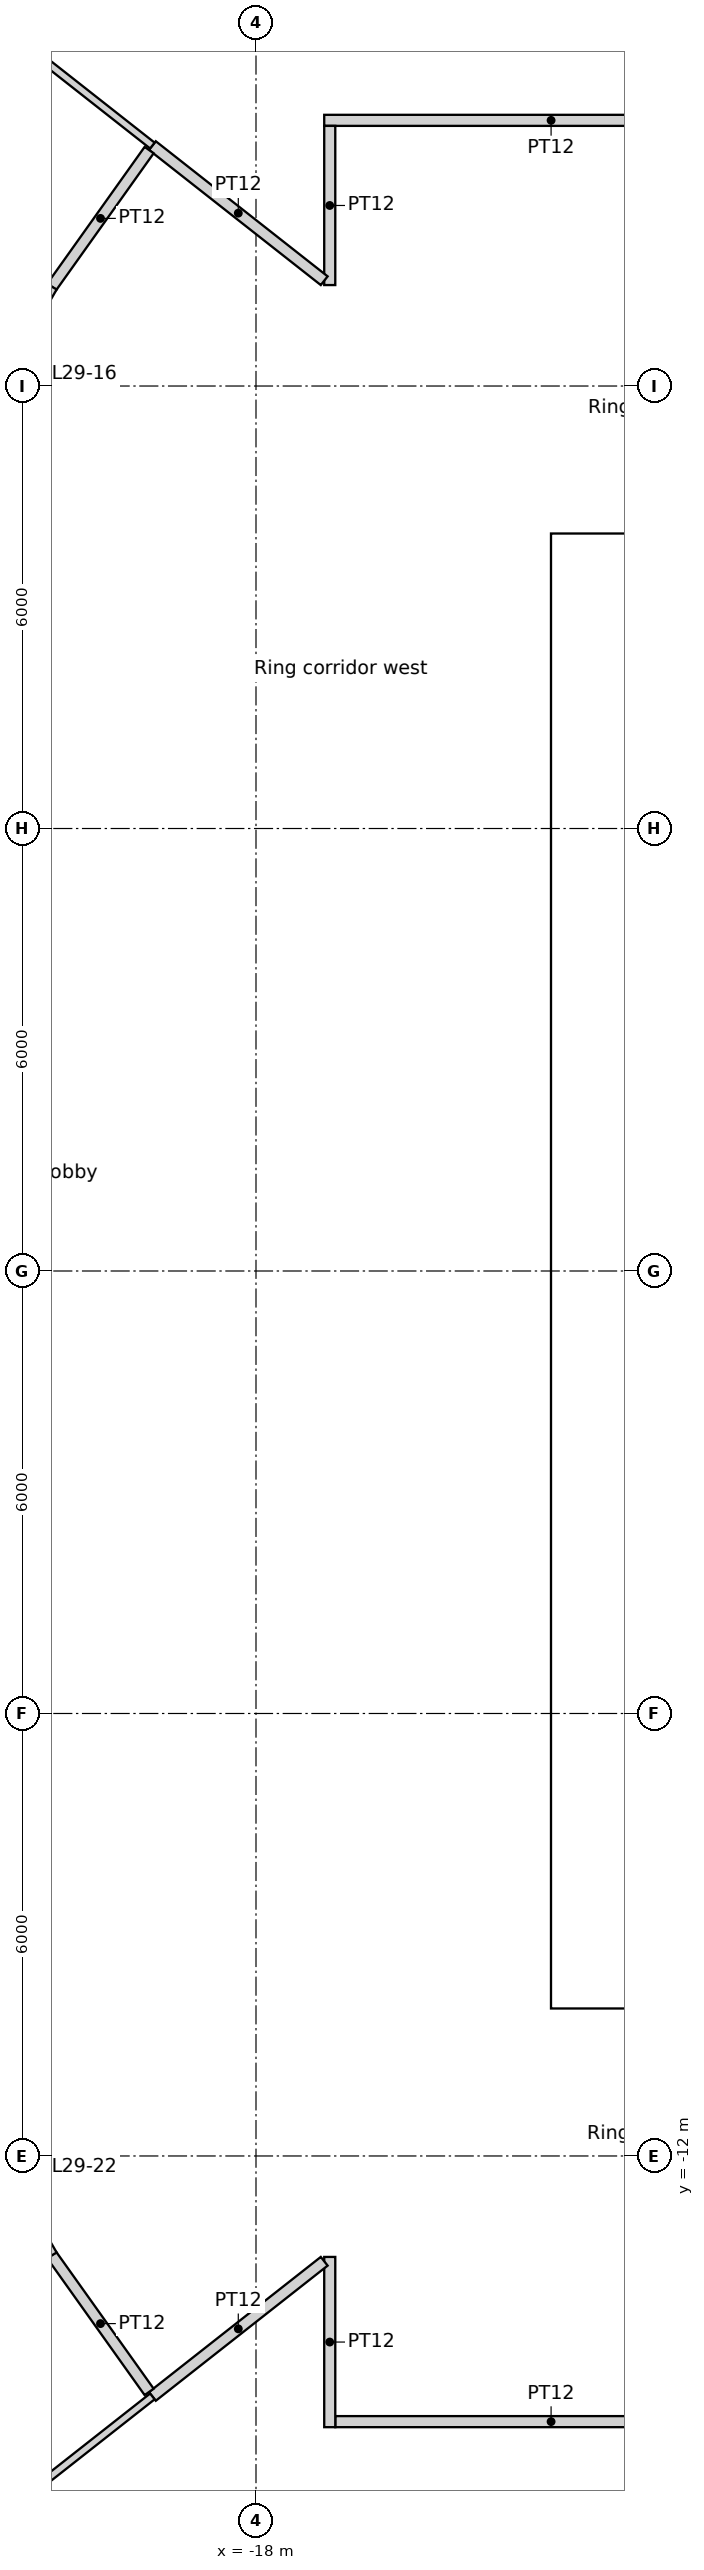
"""IFC4 building model, lengths in metres.
Left out: names, types, materials, properties, quantities, classifications, styles, units other than length and angle.
Written with IfcOpenShell. Run it as: python <this file> out.ifc"""

import sys

from ifc_helpers import new_model, si_unit, direction, frame, frame_2d, origin, origin_2d, place, context, subcontext, project, spatial, rectangle, circle, extrude, element, fill, save


model = new_model("IFC4")
c1 = context("Model", 3, precision=1e-05, world=origin(), true_north=direction((0.0, 1.0)))
c2 = subcontext(c1, "Body", "Model", "MODEL_VIEW")
j1 = project(units=[si_unit("LENGTHUNIT", "METRE"), si_unit("PLANEANGLEUNIT", "RADIAN")], contexts=[c1])
p1 = place(None, origin())
s1 = spatial("IfcSite", under=j1, at=p1, CompositionType="ELEMENT")
p2 = place(p1, origin())
s2 = spatial("IfcBuilding", under=s1, at=p2, CompositionType="ELEMENT")
p3 = place(p2, frame((0.0, 0.0, 114.6)))
s3 = spatial("IfcBuildingStorey", under=s2, at=p3, CompositionType="ELEMENT", Elevation=114.6)
for number, where, z_axis, x_axis in (
    (1, (-20.509, 13.489, 0.0), (0.0, 0.0, 1.0), (1.0, 0.0, 0.0)),
    (2, (-20.509, -13.489, 0.0), (0.0, 0.0, 1.0), (1.0, 0.0, 0.0)),
):
    element("IfcColumn", number, at=place(p3, frame(where, z_axis=z_axis, x_axis=x_axis)), inside=s3, PredefinedType="COLUMN", context=c2, shape_type="SweptSolid", body=[
        extrude(circle(Radius=0.65, at=origin_2d()), origin(), (0.0, 0.0, 1.0), 5.4),
    ])
for number, where, z_axis, x_axis in (
    (3, (-13.798, 12.802, 0.0), (0.0, 0.0, 1.0), (1.0, 0.0, 0.0)),
    (4, (-16.958, 8.167, 0.0), (0.0, 0.0, 1.0), (1.0, 0.0, 0.0)),
    (5, (-18.612, 2.805, 0.0), (0.0, 0.0, 1.0), (1.0, 0.0, 0.0)),
    (6, (-18.612, -2.805, 0.0), (0.0, 0.0, 1.0), (1.0, 0.0, 0.0)),
    (7, (-16.958, -8.167, 0.0), (0.0, 0.0, 1.0), (1.0, 0.0, 0.0)),
    (8, (-13.798, -12.802, 0.0), (0.0, 0.0, 1.0), (1.0, 0.0, 0.0)),
):
    element("IfcColumn", number, at=place(p3, frame(where, z_axis=z_axis, x_axis=x_axis)), inside=s3, PredefinedType="COLUMN", context=c2, shape_type="SweptSolid", body=[
        extrude(circle(Radius=0.7, at=origin_2d()), origin(), (0.0, 0.0, 1.0), 5.4),
    ])
p4 = place(p3, frame((-14.0, -9.4, 0.0), z_axis=(0.0, 0.0, 1.0), x_axis=(1.0, 0.0, 0.0)))
e9 = element("IfcWall", 9, at=p4, inside=s3, PredefinedType="SOLIDWALL", context=c2, shape_type="SweptSolid", body=[
    extrude(rectangle(XDim=28.0, YDim=1.2, at=frame_2d((14.0, 0.0))), origin(), (0.0, 0.0, 1.0), 5.4),
])
p5 = place(p4, frame((14.9, 0.0, 0.0)))
e10 = element("IfcOpeningElement", 10, at=p5, cuts=e9, PredefinedType="OPENING", context=c2, shape_type="SweptSolid", body=[
    extrude(rectangle(XDim=1.0, YDim=2.1, at=frame_2d((0.5, 1.05))), frame((0.0, 0.6, 0.0), z_axis=(0.0, -1.0, 0.0), x_axis=(1.0, 0.0, 0.0)), (0.0, 0.0, 1.0), 1.2),
])
p6 = place(p4, frame((9.8, 0.0, 0.0)))
e11 = element("IfcOpeningElement", 11, at=p6, cuts=e9, PredefinedType="OPENING", context=c2, shape_type="SweptSolid", body=[
    extrude(rectangle(XDim=1.8, YDim=2.1, at=frame_2d((0.9, 1.05))), frame((0.0, 0.6, 0.0), z_axis=(0.0, -1.0, 0.0), x_axis=(1.0, 0.0, 0.0)), (0.0, 0.0, 1.0), 1.2),
])
p7 = place(p4, frame((16.4, 0.0, 0.0)))
e12 = element("IfcOpeningElement", 12, at=p7, cuts=e9, PredefinedType="OPENING", context=c2, shape_type="SweptSolid", body=[
    extrude(rectangle(XDim=1.8, YDim=2.1, at=frame_2d((0.9, 1.05))), frame((0.0, 0.6, 0.0), z_axis=(0.0, -1.0, 0.0), x_axis=(1.0, 0.0, 0.0)), (0.0, 0.0, 1.0), 1.2),
])
p8 = place(p3, frame((-14.0, 9.4, 0.0), z_axis=(0.0, 0.0, 1.0), x_axis=(1.0, 0.0, 0.0)))
e13 = element("IfcWall", 13, at=p8, inside=s3, PredefinedType="SOLIDWALL", context=c2, shape_type="SweptSolid", body=[
    extrude(rectangle(XDim=28.0, YDim=1.2, at=frame_2d((14.0, 0.0))), origin(), (0.0, 0.0, 1.0), 5.4),
])
p9 = place(p8, frame((9.8, 0.0, 0.0)))
e14 = element("IfcOpeningElement", 14, at=p9, cuts=e13, PredefinedType="OPENING", context=c2, shape_type="SweptSolid", body=[
    extrude(rectangle(XDim=1.8, YDim=2.1, at=frame_2d((0.9, 1.05))), frame((0.0, 0.6, 0.0), z_axis=(0.0, -1.0, 0.0), x_axis=(1.0, 0.0, 0.0)), (0.0, 0.0, 1.0), 1.2),
])
p10 = place(p3, frame((-13.4, -8.8, 0.0), z_axis=(0.0, 0.0, 1.0), x_axis=(0.0, 1.0, 0.0)))
e15 = element("IfcWall", 15, at=p10, inside=s3, PredefinedType="SOLIDWALL", context=c2, shape_type="SweptSolid", body=[
    extrude(rectangle(XDim=17.6, YDim=1.2, at=frame_2d((8.8, 0.0))), origin(), (0.0, 0.0, 1.0), 5.4),
])
p11 = place(p10, frame((5.2, 0.0, 0.0)))
e16 = element("IfcOpeningElement", 16, at=p11, cuts=e15, PredefinedType="OPENING", context=c2, shape_type="SweptSolid", body=[
    extrude(rectangle(XDim=1.0, YDim=2.1, at=frame_2d((0.5, 1.05))), frame((0.0, 0.6, 0.0), z_axis=(0.0, -1.0, 0.0), x_axis=(1.0, 0.0, 0.0)), (0.0, 0.0, 1.0), 1.2),
])
p12 = place(p10, frame((11.4, 0.0, 0.0)))
e17 = element("IfcOpeningElement", 17, at=p12, cuts=e15, PredefinedType="OPENING", context=c2, shape_type="SweptSolid", body=[
    extrude(rectangle(XDim=1.0, YDim=2.1, at=frame_2d((0.5, 1.05))), frame((0.0, 0.6, 0.0), z_axis=(0.0, -1.0, 0.0), x_axis=(1.0, 0.0, 0.0)), (0.0, 0.0, 1.0), 1.2),
])
for number, where, z_axis, x_axis in (
    (18, (-24.638, -19.376, 0.0), (0.0, 0.0, 1.0), (0.786, 0.618, 0.0)),
    (19, (-24.638, 19.376, 0.0), (0.0, 0.0, 1.0), (0.786, -0.618, 0.0)),
):
    element("IfcWall", number, at=place(p3, frame(where, z_axis=z_axis, x_axis=x_axis)), inside=s3, PredefinedType="PARTITIONING", context=c2, shape_type="SweptSolid", body=[
        extrude(rectangle(XDim=6.657, YDim=0.1, at=frame_2d((3.329, 0.0))), origin(), (0.0, 0.0, 1.0), 4.0),
    ])
p13 = place(p3, frame((-20.768, -13.347, 0.0), z_axis=(0.0, 0.0, 1.0), x_axis=(-0.500073279432, 0.865983091751, 0.0)))
e20 = element("IfcWall", 20, at=p13, inside=s3, PredefinedType="PARTITIONING", context=c2, shape_type="SweptSolid", body=[
    extrude(rectangle(XDim=2.349, YDim=0.15, at=frame_2d((1.175, 0.0))), origin(), (0.0, 0.0, 1.0), 4.0),
])
p14 = place(p13, frame((0.925, 0.0, 0.0)))
e21 = element("IfcOpeningElement", 21, at=p14, cuts=e20, PredefinedType="OPENING", context=c2, shape_type="SweptSolid", body=[
    extrude(rectangle(XDim=0.9, YDim=2.1, at=frame_2d((0.45, 1.05))), frame((0.0, 0.075, 0.0), z_axis=(0.0, -1.0, 0.0), x_axis=(1.0, 0.0, 0.0)), (0.0, 0.0, 1.0), 0.15),
])
p15 = place(p3, frame((-20.768, -13.347, 0.0), z_axis=(0.0, 0.0, 1.0), x_axis=(0.580029104411, -0.8145957513, 0.0)))
e22 = element("IfcWall", 22, at=p15, inside=s3, PredefinedType="PARTITIONING", context=c2, shape_type="SweptSolid", body=[
    extrude(rectangle(XDim=2.274, YDim=0.15, at=frame_2d((1.137, 0.0))), origin(), (0.0, 0.0, 1.0), 4.0),
])
p16 = place(p3, frame((-21.943, 11.312, 0.0), z_axis=(0.0, 0.0, 1.0), x_axis=(0.500073279432, 0.865983091751, 0.0)))
e23 = element("IfcWall", 23, at=p16, inside=s3, PredefinedType="PARTITIONING", context=c2, shape_type="SweptSolid", body=[
    extrude(rectangle(XDim=2.349, YDim=0.15, at=frame_2d((1.175, 0.0))), origin(), (0.0, 0.0, 1.0), 4.0),
])
p17 = place(p16, frame((0.525, 0.0, 0.0)))
e24 = element("IfcOpeningElement", 24, at=p17, cuts=e23, PredefinedType="OPENING", context=c2, shape_type="SweptSolid", body=[
    extrude(rectangle(XDim=0.9, YDim=2.1, at=frame_2d((0.45, 1.05))), frame((0.0, 0.075, 0.0), z_axis=(0.0, -1.0, 0.0), x_axis=(1.0, 0.0, 0.0)), (0.0, 0.0, 1.0), 0.15),
])
p18 = place(p3, frame((-19.405, -15.26, 0.0), z_axis=(0.0, 0.0, 1.0), x_axis=(0.78606393764, 0.618145198106, 0.0)))
e25 = element("IfcWall", 25, at=p18, inside=s3, PredefinedType="PARTITIONING", context=c2, shape_type="SweptSolid", body=[
    extrude(rectangle(XDim=2.965, YDim=0.15, at=frame_2d((1.482, 0.0))), origin(), (0.0, 0.0, 1.0), 4.0),
])
p19 = place(p3, frame((-19.449, 15.199, 0.0), z_axis=(0.0, 0.0, 1.0), x_axis=(-0.580029104411, -0.8145957513, 0.0)))
e26 = element("IfcWall", 26, at=p19, inside=s3, PredefinedType="PARTITIONING", context=c2, shape_type="SweptSolid", body=[
    extrude(rectangle(XDim=2.274, YDim=0.15, at=frame_2d((1.137, 0.0))), origin(), (0.0, 0.0, 1.0), 4.0),
])
p20 = place(p3, frame((-19.405, 15.26, 0.0), z_axis=(0.0, 0.0, 1.0), x_axis=(0.78606393764, -0.618145198106, 0.0)))
e27 = element("IfcWall", 27, at=p20, inside=s3, PredefinedType="PARTITIONING", context=c2, shape_type="SweptSolid", body=[
    extrude(rectangle(XDim=2.965, YDim=0.15, at=frame_2d((1.482, 0.0))), origin(), (0.0, 0.0, 1.0), 4.0),
])
p21 = place(p3, frame((-16.925, -15.602, 0.0), z_axis=(0.0, 0.0, 1.0), x_axis=(1.0, 0.0, 0.0)))
e28 = element("IfcWall", 28, at=p21, inside=s3, PredefinedType="PARTITIONING", context=c2, shape_type="SweptSolid", body=[
    extrude(rectangle(XDim=5.853, YDim=0.15, at=frame_2d((2.926, 0.0))), origin(), (0.0, 0.0, 1.0), 4.0),
])
p22 = place(p3, frame((-17.0, -13.369, 0.0), z_axis=(0.0, 0.0, 1.0), x_axis=(0.0, -1.0, 0.0)))
e29 = element("IfcWall", 29, at=p22, inside=s3, PredefinedType="PARTITIONING", context=c2, shape_type="SweptSolid", body=[
    extrude(rectangle(XDim=2.308, YDim=0.15, at=frame_2d((1.154, 0.0))), origin(), (0.0, 0.0, 1.0), 4.0),
])
p23 = place(p3, frame((-17.0, 15.527, 0.0), z_axis=(0.0, 0.0, 1.0), x_axis=(0.0, -1.0, 0.0)))
e30 = element("IfcWall", 30, at=p23, inside=s3, PredefinedType="PARTITIONING", context=c2, shape_type="SweptSolid", body=[
    extrude(rectangle(XDim=2.158, YDim=0.15, at=frame_2d((1.079, 0.0))), origin(), (0.0, 0.0, 1.0), 4.0),
])
p24 = place(p3, frame((-10.923, 15.602, 0.0), z_axis=(0.0, 0.0, 1.0), x_axis=(-1.0, 0.0, 0.0)))
e31 = element("IfcWall", 31, at=p24, inside=s3, PredefinedType="PARTITIONING", context=c2, shape_type="SweptSolid", body=[
    extrude(rectangle(XDim=6.152, YDim=0.15, at=frame_2d((3.076, 0.0))), origin(), (0.0, 0.0, 1.0), 4.0),
])
p25 = place(p11, origin())
e32 = element("IfcDoor", 32, at=p25, inside=s3, OperationType="DOUBLE_DOOR_SINGLE_SWING", PredefinedType="DOOR", context=c2, shape_type="SweptSolid", body=[
    extrude(rectangle(XDim=1.0, YDim=2.1, at=frame_2d((0.5, 1.05))), frame((0.0, 0.025, 0.0), z_axis=(0.0, -1.0, 0.0), x_axis=(1.0, 0.0, 0.0)), (0.0, 0.0, 1.0), 0.05),
])
fill(e16, e32)
p26 = place(p12, origin())
e33 = element("IfcDoor", 33, at=p26, inside=s3, OperationType="DOUBLE_DOOR_SINGLE_SWING", PredefinedType="DOOR", context=c2, shape_type="SweptSolid", body=[
    extrude(rectangle(XDim=1.0, YDim=2.1, at=frame_2d((0.5, 1.05))), frame((0.0, 0.025, 0.0), z_axis=(0.0, -1.0, 0.0), x_axis=(1.0, 0.0, 0.0)), (0.0, 0.0, 1.0), 0.05),
])
fill(e17, e33)
save(model, sys.argv[1])
